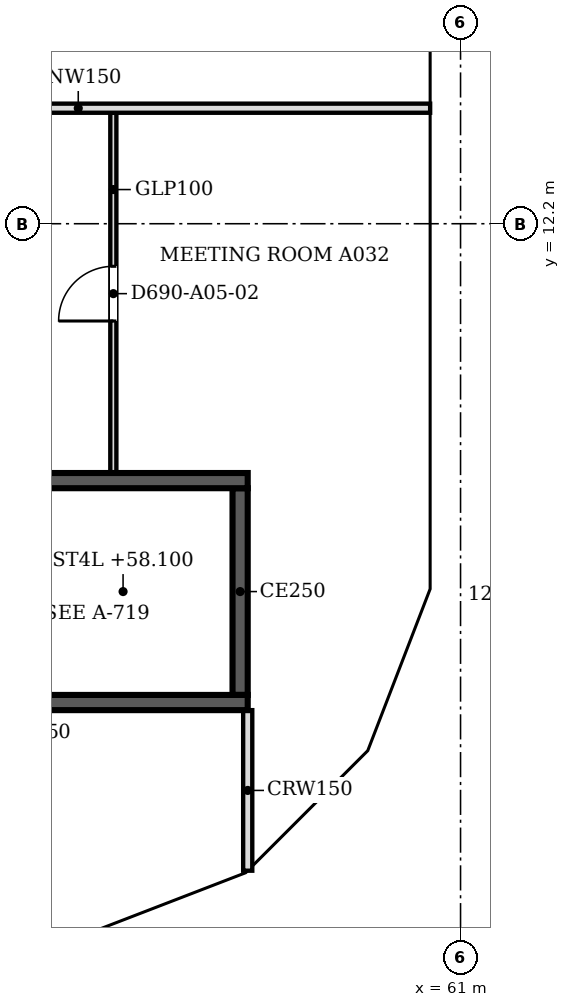
"""IFC4 building model, lengths in metres.
Left out: names, types, materials, properties, quantities, classifications, styles, units other than length and angle.
Written with IfcOpenShell. Run it as: python <this file> out.ifc"""

import sys

from ifc_helpers import new_model, si_unit, direction, frame, frame_2d, origin, place, context, subcontext, project, spatial, polyline, rectangle, outline, extrude, faceted_brep, source, transform, mapped, element, fill, save


model = new_model("IFC4")
c1 = context("Model", 3, precision=1e-05, world=origin(), true_north=direction((0.0, 1.0)))
c2 = subcontext(c1, "Body", "Model", "MODEL_VIEW")
j1 = project(units=[si_unit("LENGTHUNIT", "METRE"), si_unit("PLANEANGLEUNIT", "RADIAN")], contexts=[c1])
p1 = place(None, origin())
s1 = spatial("IfcSite", under=j1, at=p1, CompositionType="ELEMENT")
p2 = place(p1, origin())
s2 = spatial("IfcBuilding", under=s1, at=p2, CompositionType="ELEMENT")
p3 = place(p2, frame((0.0, 0.0, 56.2)))
s3 = spatial("IfcBuildingStorey", under=s2, at=p3, CompositionType="ELEMENT", Elevation=56.2)
m1 = source(origin(), c2, "Body", "Brep", [
    faceted_brep([(0.047, -0.25, 0.0), (2.997, -0.25, 3.8), (0.047, -0.25, 7.6), (0.0, -0.25, 7.541), (0.0, -0.25, 0.059), (0.093, 0.25, 7.54), (2.944, 0.25, 3.868), (2.944, 0.25, 3.732), (0.093, 0.25, 0.06), (2.997, 0.0, 3.8), (0.047, 0.0, 0.0), (0.047, 0.0, 7.6)], [[[0, 1, 2, 3, 4]], [[5, 6, 7, 8]], [[8, 7, 9, 1, 0, 10]], [[6, 5, 11, 2, 1, 9]], [[3, 2, 11]], [[10, 0, 4]], [[8, 10, 4, 3, 11, 5]], [[9, 7, 6]]]),
])
p4 = place(p3, frame((54.81, 0.233, -3.8), z_axis=(0.0, 0.0, 1.0), x_axis=(0.932990326376, 0.359901446078, 0.0)))
e1 = element("IfcWall", 1, at=p4, inside=s3, PredefinedType="SOLIDWALL", context=c2, shape_type="MappedRepresentation", body=[
    mapped(m1, transform((0.0, 0.0, 0.0), scale=1.0)),
])
m2 = source(origin(), c2, "Body", "SweptSolid", [
    extrude(outline(polyline([(0.247, 0.665), (2.681, 3.8), (0.247, 6.935), (0.247, 0.665)])), frame((0.0, 0.26, 0.0), z_axis=(0.0, -1.0, 0.0), x_axis=(1.0, 0.0, 0.0)), (0.0, 0.0, 1.0), 0.52),
])
p5 = place(p4, origin())
e2 = element("IfcOpeningElement", 2, at=p5, cuts=e1, PredefinedType="OPENING", context=c2, shape_type="MappedRepresentation", body=[
    mapped(m2, transform((0.0, 0.0, 0.0), scale=1.0)),
])
m3 = source(origin(), c2, "Body", "Brep", [
    faceted_brep([(2.944, -0.25, 0.0), (2.997, -0.25, 0.068), (2.997, -0.25, 7.532), (2.944, -0.25, 7.6), (0.0, -0.25, 3.8), (0.053, 0.25, 3.868), (2.891, 0.25, 7.532), (2.891, 0.25, 0.068), (0.053, 0.25, 3.732), (2.944, 0.0, 0.0), (2.944, 0.0, 7.6), (0.0, 0.0, 3.8)], [[[0, 1, 2, 3, 4]], [[5, 6, 7, 8]], [[1, 0, 9]], [[10, 3, 2]], [[6, 5, 11, 4, 3, 10]], [[8, 7, 9, 0, 4, 11]], [[8, 11, 5]], [[1, 9, 7, 6, 10, 2]]]),
])
p6 = place(p3, frame((57.606, 1.312, -3.8), z_axis=(0.0, 0.0, 1.0), x_axis=(0.707147509625, 0.707066050402, 0.0)))
e3 = element("IfcWall", 3, at=p6, inside=s3, PredefinedType="SOLIDWALL", context=c2, shape_type="MappedRepresentation", body=[
    mapped(m3, transform((0.0, 0.0, 0.0), scale=1.0)),
])
m4 = source(origin(), c2, "Body", "SweptSolid", [
    extrude(outline(polyline([(2.744, 6.934), (0.316, 3.8), (2.744, 0.667), (2.744, 6.934)])), frame((0.0, 0.26, 0.0), z_axis=(0.0, -1.0, 0.0), x_axis=(1.0, 0.0, 0.0)), (0.0, 0.0, 1.0), 0.52),
])
p7 = place(p6, origin())
e4 = element("IfcOpeningElement", 4, at=p7, cuts=e3, PredefinedType="OPENING", context=c2, shape_type="MappedRepresentation", body=[
    mapped(m4, transform((0.0, 0.0, 0.0), scale=1.0)),
])
m5 = source(origin(), c2, "Body", "Brep", [
    faceted_brep([(0.053, -0.25, 0.0), (3.003, -0.25, 3.8), (0.053, -0.25, 7.6), (0.0, -0.25, 7.532), (0.0, -0.25, 0.068), (0.106, 0.25, 7.532), (2.957, 0.25, 3.86), (2.957, 0.25, 3.74), (0.106, 0.25, 0.068), (3.003, 0.0, 3.8), (0.053, 0.0, 0.0), (0.053, 0.0, 7.6)], [[[0, 1, 2, 3, 4]], [[5, 6, 7, 8]], [[8, 7, 9, 1, 0, 10]], [[6, 5, 11, 2, 1, 9]], [[3, 2, 11]], [[10, 0, 4]], [[8, 10, 4, 3, 11, 5]], [[9, 7, 6]]]),
])
p8 = place(p3, frame((59.669, 3.344, -3.8), z_axis=(0.0, 0.0, 1.0), x_axis=(0.35992665181, 0.932980602862, 0.0)))
e5 = element("IfcWall", 5, at=p8, inside=s3, PredefinedType="SOLIDWALL", context=c2, shape_type="MappedRepresentation", body=[
    mapped(m5, transform((0.0, 0.0, 0.0), scale=1.0)),
])
m6 = source(origin(), c2, "Body", "SweptSolid", [
    extrude(outline(polyline([(0.253, 0.665), (2.687, 3.8), (0.253, 6.935), (0.253, 0.665)])), frame((0.0, 0.26, 0.0), z_axis=(0.0, -1.0, 0.0), x_axis=(1.0, 0.0, 0.0)), (0.0, 0.0, 1.0), 0.52),
])
p9 = place(p8, origin())
e6 = element("IfcOpeningElement", 6, at=p9, cuts=e5, PredefinedType="OPENING", context=c2, shape_type="MappedRepresentation", body=[
    mapped(m6, transform((0.0, 0.0, 0.0), scale=1.0)),
])
m7 = source(origin(), c2, "Body", "Brep", [
    faceted_brep([(3.003, -0.25, 0.0), (6.053, -0.25, 3.8), (3.003, -0.25, 7.6), (0.0, -0.25, 3.8), (0.047, 0.25, 3.859), (3.003, 0.25, 7.6), (6.053, 0.25, 3.8), (3.003, 0.25, 0.0), (0.047, 0.25, 3.741), (0.0, 0.0, 3.8)], [[[0, 1, 2, 3]], [[4, 5, 6, 7, 8]], [[7, 6, 1, 0]], [[6, 5, 2, 1]], [[5, 4, 9, 3, 2]], [[8, 7, 0, 3, 9]], [[8, 9, 4]]]),
])
p10 = place(p3, frame((60.75, 6.146, -3.8), z_axis=(0.0, 0.0, 1.0), x_axis=(0.0, 1.0, 0.0)))
e7 = element("IfcWall", 7, at=p10, inside=s3, PredefinedType="SOLIDWALL", context=c2, shape_type="MappedRepresentation", body=[
    mapped(m7, transform((0.0, 0.0, 0.0), scale=1.0)),
])
m8 = source(origin(), c2, "Body", "SweptSolid", [
    extrude(outline(polyline([(3.005, 0.401), (5.733, 3.8), (3.005, 7.199), (0.319, 3.8), (3.005, 0.401)])), frame((0.0, 0.26, 0.0), z_axis=(0.0, -1.0, 0.0), x_axis=(1.0, 0.0, 0.0)), (0.0, 0.0, 1.0), 0.52),
])
p11 = place(p10, origin())
e8 = element("IfcOpeningElement", 8, at=p11, cuts=e7, PredefinedType="OPENING", context=c2, shape_type="MappedRepresentation", body=[
    mapped(m8, transform((0.0, 0.0, 0.0), scale=1.0)),
])
m9 = source(origin(), c2, "Body", "SweptSolid", [
    extrude(outline(polyline([(3.05, 0.0), (6.1, 3.8), (3.05, 7.6), (0.0, 3.8), (3.05, 0.0)])), frame((0.0, 0.25, 0.0), z_axis=(0.0, -1.0, 0.0), x_axis=(1.0, 0.0, 0.0)), (0.0, 0.0, 1.0), 0.5),
])
p12 = place(p3, frame((60.75, 12.2, -3.8), z_axis=(0.0, 0.0, 1.0), x_axis=(0.0, 1.0, 0.0)))
e9 = element("IfcWall", 9, at=p12, inside=s3, PredefinedType="SOLIDWALL", context=c2, shape_type="MappedRepresentation", body=[
    mapped(m9, transform((0.0, 0.0, 0.0), scale=1.0)),
])
m10 = source(origin(), c2, "Body", "SweptSolid", [
    extrude(outline(polyline([(3.05, 0.399), (5.78, 3.8), (3.05, 7.201), (0.321, 3.8), (3.05, 0.399)])), frame((0.0, 0.26, 0.0), z_axis=(0.0, -1.0, 0.0), x_axis=(1.0, 0.0, 0.0)), (0.0, 0.0, 1.0), 0.52),
])
p13 = place(p12, origin())
e10 = element("IfcOpeningElement", 10, at=p13, cuts=e9, PredefinedType="OPENING", context=c2, shape_type="MappedRepresentation", body=[
    mapped(m10, transform((0.0, 0.0, 0.0), scale=1.0)),
])
p14 = place(p2, frame((0.0, 0.0, 60.0)))
s4 = spatial("IfcBuildingStorey", under=s2, at=p14, CompositionType="ELEMENT", Elevation=60.0)
m11 = source(origin(), c2, "Body", "Brep", [
    faceted_brep([(2.95, -0.25, 0.0), (3.003, -0.25, 0.068), (3.003, -0.25, 7.532), (2.95, -0.25, 7.6), (0.0, -0.25, 3.8), (0.047, 0.25, 3.86), (2.898, 0.25, 7.532), (2.898, 0.25, 0.068), (0.047, 0.25, 3.74), (2.95, 0.0, 0.0), (2.95, 0.0, 7.6), (0.0, 0.0, 3.8)], [[[0, 1, 2, 3, 4]], [[5, 6, 7, 8]], [[1, 0, 9]], [[10, 3, 2]], [[6, 5, 11, 4, 3, 10]], [[8, 7, 9, 0, 4, 11]], [[8, 11, 5]], [[1, 9, 7, 6, 10, 2]]]),
])
p15 = place(p14, frame((54.854, 0.25, -3.8), z_axis=(0.0, 0.0, 1.0), x_axis=(0.932970071518, 0.359953949349, 0.0)))
e11 = element("IfcWall", 11, at=p15, inside=s4, PredefinedType="SOLIDWALL", context=c2, shape_type="MappedRepresentation", body=[
    mapped(m11, transform((0.0, 0.0, 0.0), scale=1.0)),
])
m12 = source(origin(), c2, "Body", "SweptSolid", [
    extrude(outline(polyline([(2.75, 6.935), (0.316, 3.8), (2.75, 0.665), (2.75, 6.935)])), frame((0.0, 0.26, 0.0), z_axis=(0.0, -1.0, 0.0), x_axis=(1.0, 0.0, 0.0)), (0.0, 0.0, 1.0), 0.52),
])
p16 = place(p15, origin())
e12 = element("IfcOpeningElement", 12, at=p16, cuts=e11, PredefinedType="OPENING", context=c2, shape_type="MappedRepresentation", body=[
    mapped(m12, transform((0.0, 0.0, 0.0), scale=1.0)),
])
m13 = source(origin(), c2, "Body", "Brep", [
    faceted_brep([(0.053, -0.25, 0.0), (2.997, -0.25, 3.8), (0.053, -0.25, 7.6), (0.0, -0.25, 7.532), (0.0, -0.25, 0.068), (0.106, 0.25, 7.532), (2.944, 0.25, 3.868), (2.944, 0.25, 3.732), (0.106, 0.25, 0.068), (2.997, 0.0, 3.8), (0.053, 0.0, 0.0), (0.053, 0.0, 7.6)], [[[0, 1, 2, 3, 4]], [[5, 6, 7, 8]], [[8, 7, 9, 1, 0, 10]], [[6, 5, 11, 2, 1, 9]], [[3, 2, 11]], [[10, 0, 4]], [[8, 10, 4, 3, 11, 5]], [[9, 7, 6]]]),
])
p17 = place(p14, frame((57.569, 1.274, -3.8), z_axis=(0.0, 0.0, 1.0), x_axis=(0.707066050402, 0.707147509625, 0.0)))
e13 = element("IfcWall", 13, at=p17, inside=s4, PredefinedType="SOLIDWALL", context=c2, shape_type="MappedRepresentation", body=[
    mapped(m13, transform((0.0, 0.0, 0.0), scale=1.0)),
])
m14 = source(origin(), c2, "Body", "SweptSolid", [
    extrude(outline(polyline([(0.253, 0.666), (2.681, 3.8), (0.253, 6.934), (0.253, 0.666)])), frame((0.0, 0.26, 0.0), z_axis=(0.0, -1.0, 0.0), x_axis=(1.0, 0.0, 0.0)), (0.0, 0.0, 1.0), 0.52),
])
p18 = place(p17, origin())
e14 = element("IfcOpeningElement", 14, at=p18, cuts=e13, PredefinedType="OPENING", context=c2, shape_type="MappedRepresentation", body=[
    mapped(m14, transform((0.0, 0.0, 0.0), scale=1.0)),
])
m15 = source(origin(), c2, "Body", "Brep", [
    faceted_brep([(2.95, -0.25, 0.0), (2.997, -0.25, 0.059), (2.997, -0.25, 7.541), (2.95, -0.25, 7.6), (0.0, -0.25, 3.8), (0.053, 0.25, 3.868), (2.904, 0.25, 7.54), (2.904, 0.25, 0.06), (0.053, 0.25, 3.732), (2.95, 0.0, 0.0), (2.95, 0.0, 7.6), (0.0, 0.0, 3.8)], [[[0, 1, 2, 3, 4]], [[5, 6, 7, 8]], [[1, 0, 9]], [[10, 3, 2]], [[6, 5, 11, 4, 3, 10]], [[8, 7, 9, 0, 4, 11]], [[8, 11, 5]], [[1, 9, 7, 6, 10, 2]]]),
])
p19 = place(p14, frame((59.688, 3.394, -3.8), z_axis=(0.0, 0.0, 1.0), x_axis=(0.359972353723, 0.932962970624, 0.0)))
e15 = element("IfcWall", 15, at=p19, inside=s4, PredefinedType="SOLIDWALL", context=c2, shape_type="MappedRepresentation", body=[
    mapped(m15, transform((0.0, 0.0, 0.0), scale=1.0)),
])
p20 = place(p19, origin())
e16 = element("IfcOpeningElement", 16, at=p20, cuts=e15, PredefinedType="OPENING", context=c2, shape_type="MappedRepresentation", body=[
    mapped(m12, transform((0.0, 0.0, 0.0), scale=1.0)),
])
m16 = source(origin(), c2, "Body", "Brep", [
    faceted_brep([(0.047, -0.25, 0.0), (3.05, -0.25, 3.8), (0.047, -0.25, 7.6), (0.0, -0.25, 7.54), (0.0, -0.25, 0.06), (0.093, 0.25, 7.541), (3.05, 0.25, 3.8), (0.093, 0.25, 0.059), (0.047, 0.0, 0.0), (0.047, 0.0, 7.6)], [[[0, 1, 2, 3, 4]], [[5, 6, 7]], [[7, 6, 1, 0, 8]], [[6, 5, 9, 2, 1]], [[3, 2, 9]], [[8, 0, 4]], [[7, 8, 4, 3, 9, 5]]]),
])
p21 = place(p14, frame((60.75, 6.1, -3.8), z_axis=(0.0, 0.0, 1.0), x_axis=(0.0, 1.0, 0.0)))
e17 = element("IfcWall", 17, at=p21, inside=s4, PredefinedType="SOLIDWALL", context=c2, shape_type="MappedRepresentation", body=[
    mapped(m16, transform((0.0, 0.0, 0.0), scale=1.0)),
])
m17 = source(origin(), c2, "Body", "SweptSolid", [
    extrude(outline(polyline([(0.247, 0.656), (2.731, 3.8), (0.247, 6.944), (0.247, 0.656)])), frame((0.0, 0.26, 0.0), z_axis=(0.0, -1.0, 0.0), x_axis=(1.0, 0.0, 0.0)), (0.0, 0.0, 1.0), 0.52),
])
p22 = place(p21, origin())
e18 = element("IfcOpeningElement", 18, at=p22, cuts=e17, PredefinedType="OPENING", context=c2, shape_type="MappedRepresentation", body=[
    mapped(m17, transform((0.0, 0.0, 0.0), scale=1.0)),
])
p23 = place(p14, frame((60.75, 9.15, -3.8), z_axis=(0.0, 0.0, 1.0), x_axis=(0.0, 1.0, 0.0)))
e19 = element("IfcWall", 19, at=p23, inside=s4, PredefinedType="SOLIDWALL", context=c2, shape_type="MappedRepresentation", body=[
    mapped(m9, transform((0.0, 0.0, 0.0), scale=1.0)),
])
p24 = place(p23, origin())
e20 = element("IfcOpeningElement", 20, at=p24, cuts=e19, PredefinedType="OPENING", context=c2, shape_type="MappedRepresentation", body=[
    mapped(m10, transform((0.0, 0.0, 0.0), scale=1.0)),
])
p25 = place(p3, frame((57.5, 4.325, 0.0), z_axis=(0.0, 0.0, 1.0), x_axis=(-1.0, 0.0, 0.0)))
e21 = element("IfcWall", 21, at=p25, inside=s3, PredefinedType="SOLIDWALL", context=c2, shape_type="SweptSolid", body=[
    extrude(rectangle(XDim=8.5, YDim=0.25, at=frame_2d((4.25, 0.0))), origin(), (0.0, 0.0, 1.0), 3.8),
])
m18 = source(origin(), c2, "Body", "SweptSolid", [
    extrude(rectangle(XDim=1.2, YDim=2.1, at=frame_2d((0.6, 1.05))), frame((0.0, 0.135, 0.0), z_axis=(0.0, -1.0, 0.0), x_axis=(1.0, 0.0, 0.0)), (0.0, 0.0, 1.0), 0.27),
])
p26 = place(p25, frame((6.9, 0.0, 0.0)))
e22 = element("IfcOpeningElement", 22, at=p26, cuts=e21, PredefinedType="OPENING", context=c2, shape_type="MappedRepresentation", body=[
    mapped(m18, transform((0.0, 0.0, 0.0), scale=1.0)),
])
p27 = place(p3, frame((49.0, 7.975, 0.0), z_axis=(0.0, 0.0, 1.0), x_axis=(1.0, 0.0, 0.0)))
e23 = element("IfcWall", 23, at=p27, inside=s3, PredefinedType="SOLIDWALL", context=c2, shape_type="SweptSolid", body=[
    extrude(rectangle(XDim=8.5, YDim=0.25, at=frame_2d((4.25, 0.0))), origin(), (0.0, 0.0, 1.0), 3.8),
])
p28 = place(p3, frame((57.375, 7.85, 0.0), z_axis=(0.0, 0.0, 1.0), x_axis=(0.0, -1.0, 0.0)))
e24 = element("IfcWall", 24, at=p28, inside=s3, PredefinedType="SOLIDWALL", context=c2, shape_type="SweptSolid", body=[
    extrude(rectangle(XDim=3.4, YDim=0.25, at=frame_2d((1.7, 0.0))), origin(), (0.0, 0.0, 1.0), 3.8),
])
p29 = place(p3, frame((57.5, 1.559, 0.0), z_axis=(0.0, 0.0, 1.0), x_axis=(0.0, 1.0, 0.0)))
e25 = element("IfcWall", 25, at=p29, inside=s3, PredefinedType="PARTITIONING", context=c2, shape_type="SweptSolid", body=[
    extrude(rectangle(XDim=2.641, YDim=0.15, at=frame_2d((1.32, 0.0))), origin(), (0.0, 0.0, 1.0), 3.067),
])
p30 = place(p3, frame((55.29, 14.024, 0.0), z_axis=(0.0, 0.0, 1.0), x_axis=(0.0, -1.0, 0.0)))
e26 = element("IfcWall", 26, at=p30, inside=s3, PredefinedType="PARTITIONING", context=c2, shape_type="SweptSolid", body=[
    extrude(rectangle(XDim=5.924, YDim=0.1, at=frame_2d((2.962, 0.0))), origin(), (0.0, 0.0, 1.0), 3.067),
])
m19 = source(origin(), c2, "Body", "SweptSolid", [
    extrude(rectangle(XDim=0.9, YDim=2.1, at=frame_2d((0.45, 1.05))), frame((0.0, 0.06, 0.0), z_axis=(0.0, -1.0, 0.0), x_axis=(1.0, 0.0, 0.0)), (0.0, 0.0, 1.0), 0.12),
])
p31 = place(p30, frame((2.524, 0.0, 0.0)))
e27 = element("IfcOpeningElement", 27, at=p31, cuts=e26, PredefinedType="OPENING", context=c2, shape_type="MappedRepresentation", body=[
    mapped(m19, transform((0.0, 0.0, 0.0), scale=1.0)),
])
p32 = place(p3, frame((48.926, 14.1, 0.0), z_axis=(0.0, 0.0, 1.0), x_axis=(1.0, 0.0, 0.0)))
e28 = element("IfcWall", 28, at=p32, inside=s3, PredefinedType="PARTITIONING", context=c2, shape_type="SweptSolid", body=[
    extrude(rectangle(XDim=11.574, YDim=0.15, at=frame_2d((5.787, 0.0))), origin(), (0.0, 0.0, 1.0), 3.067),
])
m20 = source(origin(), c2, "Body", "SweptSolid", [
    extrude(rectangle(XDim=0.9, YDim=2.1, at=frame_2d((0.45, 1.05))), frame((0.0, 0.025, 0.0), z_axis=(0.0, -1.0, 0.0), x_axis=(1.0, 0.0, 0.0)), (0.0, 0.0, 1.0), 0.05),
])
p33 = place(p31, origin())
e29 = element("IfcDoor", 29, at=p33, inside=s3, OperationType="SINGLE_SWING_RIGHT", PredefinedType="DOOR", context=c2, shape_type="MappedRepresentation", body=[
    mapped(m20, transform((0.0, 0.0, 0.0), scale=1.0)),
])
fill(e27, e29)
save(model, sys.argv[1])
